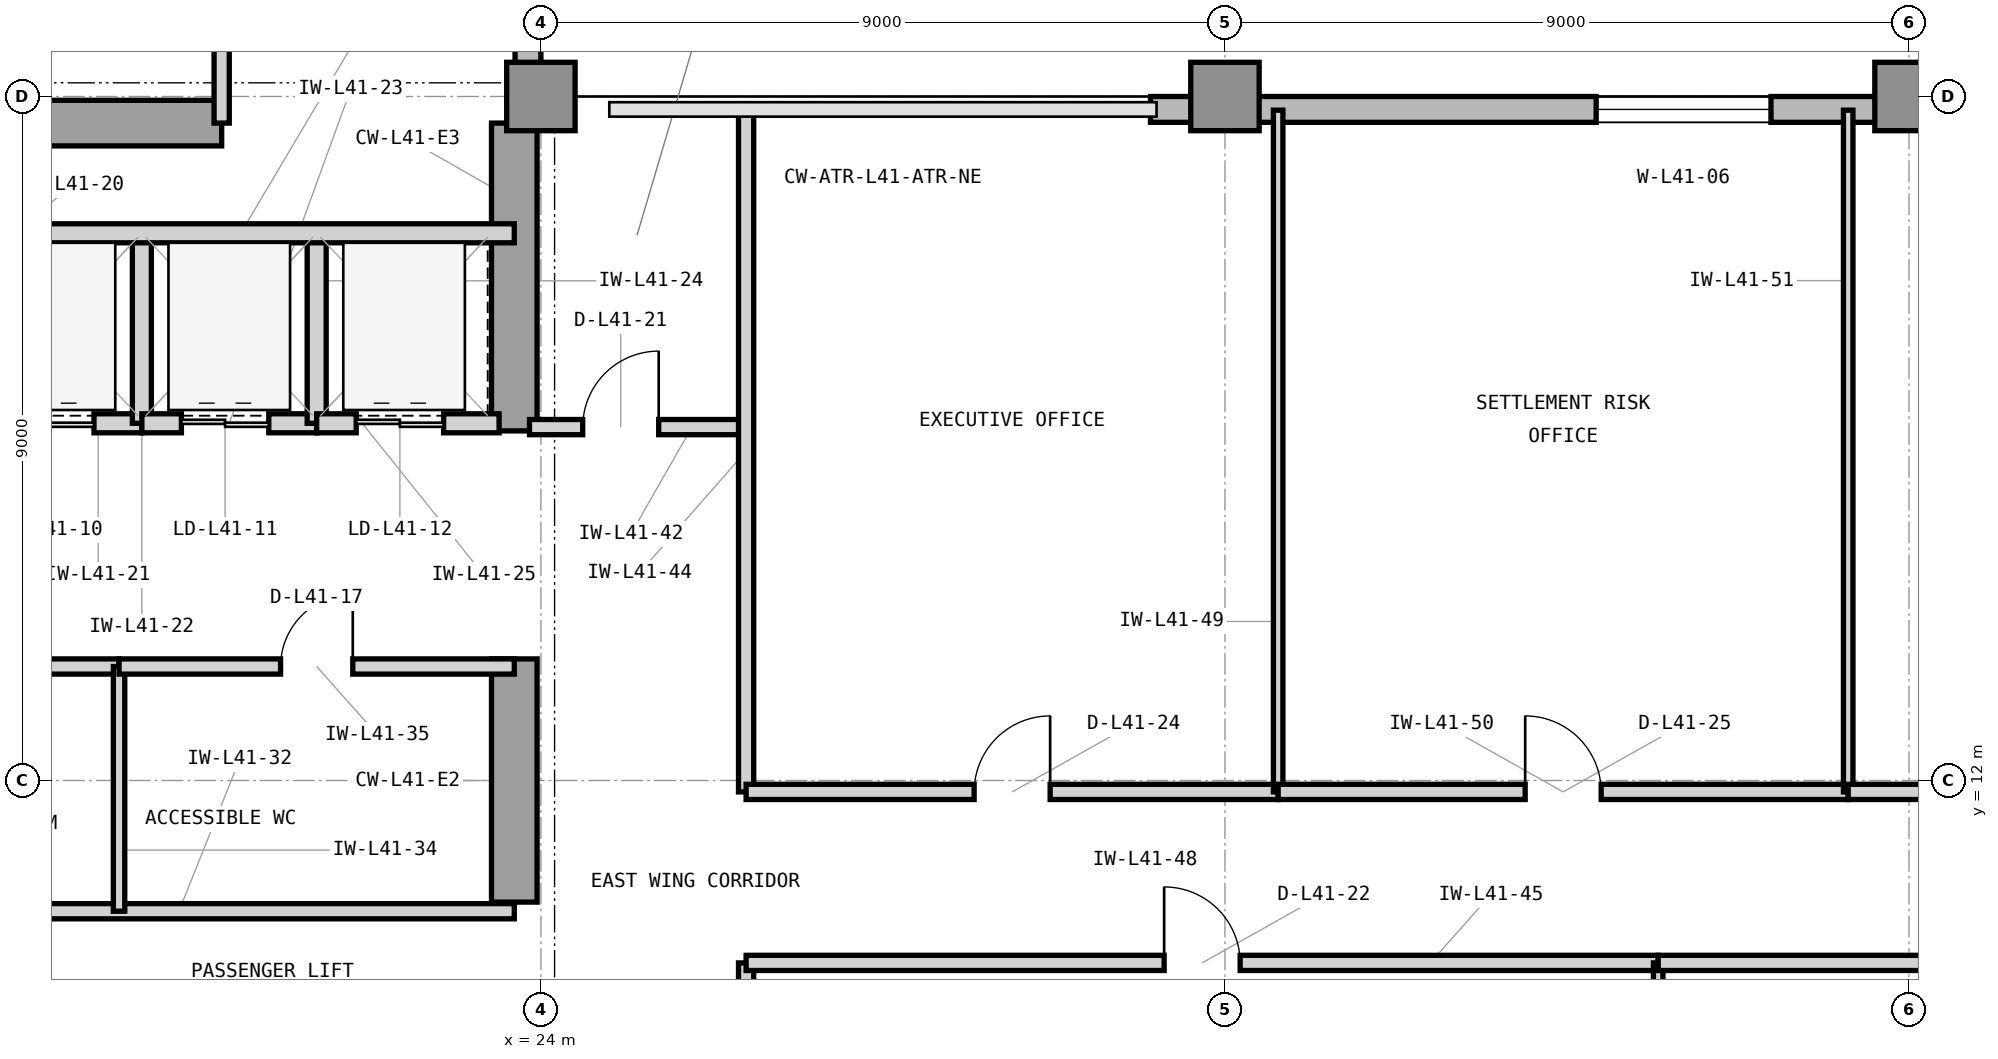
"""IFC4 building model, lengths in metres.
Left out: names, types, materials, properties, quantities, classifications, styles, units other than length and angle.
Written with IfcOpenShell. Run it as: python <this file> out.ifc"""

import sys

from ifc_helpers import new_model, si_unit, direction, frame, frame_2d, origin, origin_2d, place, context, subcontext, project, spatial, rectangle, extrude, element, fill, save


model = new_model("IFC4")
c1 = context("Model", 3, precision=1e-05, world=origin(), true_north=direction((0.0, 1.0)))
c2 = subcontext(c1, "Body", "Model", "MODEL_VIEW")
j1 = project(units=[si_unit("LENGTHUNIT", "METRE"), si_unit("PLANEANGLEUNIT", "RADIAN")], contexts=[c1])
p1 = place(None, origin())
s1 = spatial("IfcSite", under=j1, at=p1, CompositionType="ELEMENT")
p2 = place(p1, origin())
s2 = spatial("IfcBuilding", under=s1, at=p2, CompositionType="ELEMENT")
p3 = place(p2, frame((0.0, 0.0, 172.2)))
s3 = spatial("IfcBuildingStorey", under=s2, at=p3, CompositionType="ELEMENT", Elevation=172.2)
p4 = place(p3, frame((7.475, 20.65, 0.0), z_axis=(0.0, 0.0, 1.0), x_axis=(1.0, 0.0, 0.0)))
e1 = element("IfcWall", 1, at=p4, inside=s3, PredefinedType="SHEAR", context=c2, shape_type="SweptSolid", body=[
    extrude(rectangle(XDim=12.325, YDim=0.6, at=frame_2d((6.163, 0.0))), origin(), (0.0, 0.0, 1.0), 3.9),
])
p5 = place(p3, frame((23.65, 10.4, 0.0), z_axis=(0.0, 0.0, 1.0), x_axis=(0.0, 1.0, 0.0)))
e2 = element("IfcWall", 2, at=p5, inside=s3, PredefinedType="SHEAR", context=c2, shape_type="SweptSolid", body=[
    extrude(rectangle(XDim=3.2, YDim=0.6, at=frame_2d((1.6, 0.0))), origin(), (0.0, 0.0, 1.0), 3.9),
])
p6 = place(p3, frame((23.65, 16.6, 0.0), z_axis=(0.0, 0.0, 1.0), x_axis=(0.0, 1.0, 0.0)))
e3 = element("IfcWall", 3, at=p6, inside=s3, PredefinedType="SHEAR", context=c2, shape_type="SweptSolid", body=[
    extrude(rectangle(XDim=4.05, YDim=0.6, at=frame_2d((2.025, 0.0))), origin(), (0.0, 0.0, 1.0), 3.9),
])
for number, where, z_axis, x_axis in (
    (4, (24.0, 21.0, 0.0), (0.0, 0.0, 1.0), (1.0, 0.0, 0.0)),
    (5, (33.0, 21.0, 0.0), (0.0, 0.0, 1.0), (1.0, 0.0, 0.0)),
    (6, (42.0, 21.0, 0.0), (0.0, 0.0, 1.0), (1.0, 0.0, 0.0)),
):
    element("IfcColumn", number, at=place(p3, frame(where, z_axis=z_axis, x_axis=x_axis)), inside=s3, PredefinedType="COLUMN", context=c2, shape_type="SweptSolid", body=[
        extrude(rectangle(XDim=0.9, YDim=0.9, at=origin_2d()), origin(), (0.0, 0.0, 1.0), 3.9),
    ])
p7 = place(p3, frame((55.4, 20.83, 0.0), z_axis=(0.0, 0.0, 1.0), x_axis=(-1.0, 0.0, 0.0)))
e7 = element("IfcWall", 7, at=p7, inside=s3, PredefinedType="STANDARD", context=c2, shape_type="SweptSolid", body=[
    extrude(rectangle(XDim=23.38, YDim=0.34, at=frame_2d((11.69, 0.0))), origin(), (0.0, 0.0, 1.0), 3.7),
])
p8 = place(p7, frame((15.216, 0.0, 0.9)))
e8 = element("IfcOpeningElement", 8, at=p8, cuts=e7, PredefinedType="OPENING", context=c2, shape_type="SweptSolid", body=[
    extrude(rectangle(XDim=2.3, YDim=2.2, at=frame_2d((1.15, 1.1))), frame((0.0, 0.18, 0.0), z_axis=(0.0, -1.0, 0.0), x_axis=(1.0, 0.0, 0.0)), (0.0, 0.0, 1.0), 0.36),
])
p9 = place(p7, frame((8.675, 0.0, 0.9)))
e9 = element("IfcOpeningElement", 9, at=p9, cuts=e7, PredefinedType="OPENING", context=c2, shape_type="SweptSolid", body=[
    extrude(rectangle(XDim=2.3, YDim=2.2, at=frame_2d((1.15, 1.1))), frame((0.0, 0.18, 0.0), z_axis=(0.0, -1.0, 0.0), x_axis=(1.0, 0.0, 0.0)), (0.0, 0.0, 1.0), 0.36),
])
p10 = place(p3, frame((23.83, 21.0, 0.0), z_axis=(0.0, 0.0, 1.0), x_axis=(0.0, 1.0, 0.0)))
e10 = element("IfcWall", 10, at=p10, inside=s3, PredefinedType="STANDARD", context=c2, shape_type="SweptSolid", body=[
    extrude(rectangle(XDim=22.4, YDim=0.34, at=frame_2d((11.2, 0.0))), origin(), (0.0, 0.0, 1.0), 3.7),
])
p11 = place(p3, frame((16.45, 16.7, 0.0), z_axis=(0.0, 0.0, 1.0), x_axis=(1.0, 0.0, 0.0)))
e11 = element("IfcWall", 11, at=p11, inside=s3, PredefinedType="PARTITIONING", context=c2, shape_type="SweptSolid", body=[
    extrude(rectangle(XDim=2.3, YDim=0.25, at=frame_2d((1.15, 0.0))), origin(), (0.0, 0.0, 1.0), 3.283),
])
p12 = place(p11, frame((0.52, 0.0, 0.0)))
e12 = element("IfcOpeningElement", 12, at=p12, cuts=e11, PredefinedType="OPENING", context=c2, shape_type="SweptSolid", body=[
    extrude(rectangle(XDim=1.15, YDim=2.25, at=frame_2d((0.575, 1.125))), frame((0.0, 0.135, 0.0), z_axis=(0.0, -1.0, 0.0), x_axis=(1.0, 0.0, 0.0)), (0.0, 0.0, 1.0), 0.27),
])
p13 = place(p3, frame((18.75, 16.7, 0.0), z_axis=(0.0, 0.0, 1.0), x_axis=(0.0, 1.0, 0.0)))
e13 = element("IfcWall", 13, at=p13, inside=s3, PredefinedType="PARTITIONING", context=c2, shape_type="SweptSolid", body=[
    extrude(rectangle(XDim=2.5, YDim=0.25, at=frame_2d((1.25, 0.0))), origin(), (0.0, 0.0, 1.0), 3.69),
])
p14 = place(p3, frame((18.75, 16.7, 0.0), z_axis=(0.0, 0.0, 1.0), x_axis=(1.0, 0.0, 0.0)))
e14 = element("IfcWall", 14, at=p14, inside=s3, PredefinedType="PARTITIONING", context=c2, shape_type="SweptSolid", body=[
    extrude(rectangle(XDim=2.3, YDim=0.25, at=frame_2d((1.15, 0.0))), origin(), (0.0, 0.0, 1.0), 3.283),
])
p15 = place(p14, frame((0.52, 0.0, 0.0)))
e15 = element("IfcOpeningElement", 15, at=p15, cuts=e14, PredefinedType="OPENING", context=c2, shape_type="SweptSolid", body=[
    extrude(rectangle(XDim=1.15, YDim=2.25, at=frame_2d((0.575, 1.125))), frame((0.0, 0.135, 0.0), z_axis=(0.0, -1.0, 0.0), x_axis=(1.0, 0.0, 0.0)), (0.0, 0.0, 1.0), 0.27),
])
p16 = place(p3, frame((21.05, 16.7, 0.0), z_axis=(0.0, 0.0, 1.0), x_axis=(0.0, 1.0, 0.0)))
e16 = element("IfcWall", 16, at=p16, inside=s3, PredefinedType="PARTITIONING", context=c2, shape_type="SweptSolid", body=[
    extrude(rectangle(XDim=2.5, YDim=0.25, at=frame_2d((1.25, 0.0))), origin(), (0.0, 0.0, 1.0), 3.69),
])
p17 = place(p3, frame((21.05, 16.7, 0.0), z_axis=(0.0, 0.0, 1.0), x_axis=(1.0, 0.0, 0.0)))
e17 = element("IfcWall", 17, at=p17, inside=s3, PredefinedType="PARTITIONING", context=c2, shape_type="SweptSolid", body=[
    extrude(rectangle(XDim=2.4, YDim=0.25, at=frame_2d((1.2, 0.0))), origin(), (0.0, 0.0, 1.0), 3.283),
])
p18 = place(p17, frame((0.52, 0.0, 0.0)))
e18 = element("IfcOpeningElement", 18, at=p18, cuts=e17, PredefinedType="OPENING", context=c2, shape_type="SweptSolid", body=[
    extrude(rectangle(XDim=1.15, YDim=2.25, at=frame_2d((0.575, 1.125))), frame((0.0, 0.135, 0.0), z_axis=(0.0, -1.0, 0.0), x_axis=(1.0, 0.0, 0.0)), (0.0, 0.0, 1.0), 0.27),
])
p19 = place(p3, frame((16.45, 19.2, 0.0), z_axis=(0.0, 0.0, 1.0), x_axis=(1.0, 0.0, 0.0)))
e19 = element("IfcWall", 19, at=p19, inside=s3, PredefinedType="PARTITIONING", context=c2, shape_type="SweptSolid", body=[
    extrude(rectangle(XDim=7.2, YDim=0.25, at=frame_2d((3.6, 0.0))), origin(), (0.0, 0.0, 1.0), 3.69),
])
p20 = place(p3, frame((14.825, 10.28, 0.0), z_axis=(0.0, 0.0, 1.0), x_axis=(1.0, 0.0, 0.0)))
e20 = element("IfcWall", 20, at=p20, inside=s3, PredefinedType="PARTITIONING", context=c2, shape_type="SweptSolid", body=[
    extrude(rectangle(XDim=8.825, YDim=0.2, at=frame_2d((4.413, 0.0))), origin(), (0.0, 0.0, 1.0), 3.69),
])
p21 = place(p3, frame((14.7, 13.5, 0.0), z_axis=(0.0, 0.0, 1.0), x_axis=(1.0, 0.0, 0.0)))
e21 = element("IfcWall", 21, at=p21, inside=s3, PredefinedType="PARTITIONING", context=c2, shape_type="SweptSolid", body=[
    extrude(rectangle(XDim=3.75, YDim=0.2, at=frame_2d((1.875, 0.0))), origin(), (0.0, 0.0, 1.0), 3.283),
])
p22 = place(p21, frame((1.4, 0.0, 0.0)))
e22 = element("IfcOpeningElement", 22, at=p22, cuts=e21, PredefinedType="OPENING", context=c2, shape_type="SweptSolid", body=[
    extrude(rectangle(XDim=0.95, YDim=2.1, at=frame_2d((0.475, 1.05))), frame((0.0, 0.11, 0.0), z_axis=(0.0, -1.0, 0.0), x_axis=(1.0, 0.0, 0.0)), (0.0, 0.0, 1.0), 0.22),
])
p23 = place(p3, frame((18.45, 10.28, 0.0), z_axis=(0.0, 0.0, 1.0), x_axis=(0.0, 1.0, 0.0)))
e23 = element("IfcWall", 23, at=p23, inside=s3, PredefinedType="PARTITIONING", context=c2, shape_type="SweptSolid", body=[
    extrude(rectangle(XDim=3.22, YDim=0.15, at=frame_2d((1.61, 0.0))), origin(), (0.0, 0.0, 1.0), 3.69),
])
p24 = place(p3, frame((18.45, 13.5, 0.0), z_axis=(0.0, 0.0, 1.0), x_axis=(1.0, 0.0, 0.0)))
e24 = element("IfcWall", 24, at=p24, inside=s3, PredefinedType="PARTITIONING", context=c2, shape_type="SweptSolid", body=[
    extrude(rectangle(XDim=5.2, YDim=0.2, at=frame_2d((2.6, 0.0))), origin(), (0.0, 0.0, 1.0), 3.283),
])
p25 = place(p24, frame((2.125, 0.0, 0.0)))
e25 = element("IfcOpeningElement", 25, at=p25, cuts=e24, PredefinedType="OPENING", context=c2, shape_type="SweptSolid", body=[
    extrude(rectangle(XDim=0.95, YDim=2.1, at=frame_2d((0.475, 1.05))), frame((0.0, 0.11, 0.0), z_axis=(0.0, -1.0, 0.0), x_axis=(1.0, 0.0, 0.0)), (0.0, 0.0, 1.0), 0.22),
])
p26 = place(p3, frame((23.85, 16.65, 0.0), z_axis=(0.0, 0.0, 1.0), x_axis=(1.0, 0.0, 0.0)))
e26 = element("IfcWall", 26, at=p26, inside=s3, PredefinedType="PARTITIONING", context=c2, shape_type="SweptSolid", body=[
    extrude(rectangle(XDim=2.85, YDim=0.2, at=frame_2d((1.425, 0.0))), origin(), (0.0, 0.0, 1.0), 3.69),
])
p27 = place(p26, frame((0.7, 0.0, 0.0)))
e27 = element("IfcOpeningElement", 27, at=p27, cuts=e26, PredefinedType="OPENING", context=c2, shape_type="SweptSolid", body=[
    extrude(rectangle(XDim=1.0, YDim=2.15, at=frame_2d((0.5, 1.075))), frame((0.0, 0.11, 0.0), z_axis=(0.0, -1.0, 0.0), x_axis=(1.0, 0.0, 0.0)), (0.0, 0.0, 1.0), 0.22),
])
p28 = place(p3, frame((26.7, 3.18, 0.0), z_axis=(0.0, 0.0, 1.0), x_axis=(0.0, 1.0, 0.0)))
e28 = element("IfcWall", 28, at=p28, inside=s3, PredefinedType="PARTITIONING", context=c2, shape_type="SweptSolid", body=[
    extrude(rectangle(XDim=6.42, YDim=0.2, at=frame_2d((3.21, 0.0))), origin(), (0.0, 0.0, 1.0), 3.69),
])
p29 = place(p3, frame((26.7, 11.85, 0.0), z_axis=(0.0, 0.0, 1.0), x_axis=(0.0, 1.0, 0.0)))
e29 = element("IfcWall", 29, at=p29, inside=s3, PredefinedType="PARTITIONING", context=c2, shape_type="SweptSolid", body=[
    extrude(rectangle(XDim=8.97, YDim=0.2, at=frame_2d((4.485, 0.0))), origin(), (0.0, 0.0, 1.0), 3.69),
])
p30 = place(p3, frame((26.7, 9.6, 0.0), z_axis=(0.0, 0.0, 1.0), x_axis=(1.0, 0.0, 0.0)))
e30 = element("IfcWall", 30, at=p30, inside=s3, PredefinedType="PARTITIONING", context=c2, shape_type="SweptSolid", body=[
    extrude(rectangle(XDim=12.0, YDim=0.2, at=frame_2d((6.0, 0.0))), origin(), (0.0, 0.0, 1.0), 3.69),
])
p31 = place(p30, frame((5.5, 0.0, 0.0)))
e31 = element("IfcOpeningElement", 31, at=p31, cuts=e30, PredefinedType="OPENING", context=c2, shape_type="SweptSolid", body=[
    extrude(rectangle(XDim=1.0, YDim=2.15, at=frame_2d((0.5, 1.075))), frame((0.0, 0.11, 0.0), z_axis=(0.0, -1.0, 0.0), x_axis=(1.0, 0.0, 0.0)), (0.0, 0.0, 1.0), 0.22),
])
p32 = place(p3, frame((38.7, 3.18, 0.0), z_axis=(0.0, 0.0, 1.0), x_axis=(0.0, 1.0, 0.0)))
e32 = element("IfcWall", 32, at=p32, inside=s3, PredefinedType="PARTITIONING", context=c2, shape_type="SweptSolid", body=[
    extrude(rectangle(XDim=6.42, YDim=0.125, at=frame_2d((3.21, 0.0))), origin(), (0.0, 0.0, 1.0), 3.69),
])
p33 = place(p3, frame((38.7, 9.6, 0.0), z_axis=(0.0, 0.0, 1.0), x_axis=(1.0, 0.0, 0.0)))
e33 = element("IfcWall", 33, at=p33, inside=s3, PredefinedType="PARTITIONING", context=c2, shape_type="SweptSolid", body=[
    extrude(rectangle(XDim=11.3, YDim=0.2, at=frame_2d((5.65, 0.0))), origin(), (0.0, 0.0, 1.0), 3.69),
])
p34 = place(p33, frame((4.9, 0.0, 0.0)))
e34 = element("IfcOpeningElement", 34, at=p34, cuts=e33, PredefinedType="OPENING", context=c2, shape_type="SweptSolid", body=[
    extrude(rectangle(XDim=1.5, YDim=2.3, at=frame_2d((0.75, 1.15))), frame((0.0, 0.11, 0.0), z_axis=(0.0, -1.0, 0.0), x_axis=(1.0, 0.0, 0.0)), (0.0, 0.0, 1.0), 0.22),
])
p35 = place(p3, frame((26.7, 11.85, 0.0), z_axis=(0.0, 0.0, 1.0), x_axis=(1.0, 0.0, 0.0)))
e35 = element("IfcWall", 35, at=p35, inside=s3, PredefinedType="PARTITIONING", context=c2, shape_type="SweptSolid", body=[
    extrude(rectangle(XDim=7.0, YDim=0.2, at=frame_2d((3.5, 0.0))), origin(), (0.0, 0.0, 1.0), 3.69),
])
p36 = place(p35, frame((3.0, 0.0, 0.0)))
e36 = element("IfcOpeningElement", 36, at=p36, cuts=e35, PredefinedType="OPENING", context=c2, shape_type="SweptSolid", body=[
    extrude(rectangle(XDim=1.0, YDim=2.15, at=frame_2d((0.5, 1.075))), frame((0.0, 0.11, 0.0), z_axis=(0.0, -1.0, 0.0), x_axis=(1.0, 0.0, 0.0)), (0.0, 0.0, 1.0), 0.22),
])
p37 = place(p3, frame((33.7, 11.85, 0.0), z_axis=(0.0, 0.0, 1.0), x_axis=(0.0, 1.0, 0.0)))
e37 = element("IfcWall", 37, at=p37, inside=s3, PredefinedType="PARTITIONING", context=c2, shape_type="SweptSolid", body=[
    extrude(rectangle(XDim=8.97, YDim=0.125, at=frame_2d((4.485, 0.0))), origin(), (0.0, 0.0, 1.0), 3.69),
])
p38 = place(p3, frame((33.7, 11.85, 0.0), z_axis=(0.0, 0.0, 1.0), x_axis=(1.0, 0.0, 0.0)))
e38 = element("IfcWall", 38, at=p38, inside=s3, PredefinedType="PARTITIONING", context=c2, shape_type="SweptSolid", body=[
    extrude(rectangle(XDim=7.5, YDim=0.2, at=frame_2d((3.75, 0.0))), origin(), (0.0, 0.0, 1.0), 3.69),
])
p39 = place(p38, frame((3.25, 0.0, 0.0)))
e39 = element("IfcOpeningElement", 39, at=p39, cuts=e38, PredefinedType="OPENING", context=c2, shape_type="SweptSolid", body=[
    extrude(rectangle(XDim=1.0, YDim=2.15, at=frame_2d((0.5, 1.075))), frame((0.0, 0.11, 0.0), z_axis=(0.0, -1.0, 0.0), x_axis=(1.0, 0.0, 0.0)), (0.0, 0.0, 1.0), 0.22),
])
p40 = place(p3, frame((41.2, 11.85, 0.0), z_axis=(0.0, 0.0, 1.0), x_axis=(0.0, 1.0, 0.0)))
e40 = element("IfcWall", 40, at=p40, inside=s3, PredefinedType="PARTITIONING", context=c2, shape_type="SweptSolid", body=[
    extrude(rectangle(XDim=8.97, YDim=0.125, at=frame_2d((4.485, 0.0))), origin(), (0.0, 0.0, 1.0), 3.69),
])
p41 = place(p3, frame((41.2, 11.85, 0.0), z_axis=(0.0, 0.0, 1.0), x_axis=(1.0, 0.0, 0.0)))
e41 = element("IfcWall", 41, at=p41, inside=s3, PredefinedType="PARTITIONING", context=c2, shape_type="SweptSolid", body=[
    extrude(rectangle(XDim=8.8, YDim=0.2, at=frame_2d((4.4, 0.0))), origin(), (0.0, 0.0, 1.0), 3.69),
])
p42 = place(p41, frame((3.9, 0.0, 0.0)))
e42 = element("IfcOpeningElement", 42, at=p42, cuts=e41, PredefinedType="OPENING", context=c2, shape_type="SweptSolid", body=[
    extrude(rectangle(XDim=1.0, YDim=2.15, at=frame_2d((0.5, 1.075))), frame((0.0, 0.11, 0.0), z_axis=(0.0, -1.0, 0.0), x_axis=(1.0, 0.0, 0.0)), (0.0, 0.0, 1.0), 0.22),
])
p43 = place(p3, frame((19.8, 20.65, 0.0), z_axis=(0.0, 0.0, 1.0), x_axis=(0.0, 1.0, 0.0)))
e43 = element("IfcWall", 43, at=p43, inside=s3, PredefinedType="PARTITIONING", context=c2, shape_type="SweptSolid", body=[
    extrude(rectangle(XDim=6.15, YDim=0.2, at=frame_2d((3.075, 0.0))), origin(), (0.0, 0.0, 1.0), 3.69),
])
p44 = place(p8, origin())
e44 = element("IfcWindow", 44, at=p44, inside=s3, PartitioningType="SINGLE_PANEL", PredefinedType="WINDOW", context=c2, shape_type="SweptSolid", body=[
    extrude(rectangle(XDim=2.3, YDim=2.2, at=frame_2d((1.15, 1.1))), frame((0.0, 0.11, 0.0), z_axis=(0.0, -1.0, 0.0), x_axis=(1.0, 0.0, 0.0)), (0.0, 0.0, 1.0), 0.06),
])
fill(e8, e44)
p45 = place(p12, origin())
e45 = element("IfcDoor", 45, at=p45, inside=s3, OperationType="DOUBLE_DOOR_SLIDING", PredefinedType="DOOR", context=c2, shape_type="SweptSolid", body=[
    extrude(rectangle(XDim=1.15, YDim=2.25, at=frame_2d((0.575, 1.125))), frame((0.0, 0.025, 0.0), z_axis=(0.0, -1.0, 0.0), x_axis=(1.0, 0.0, 0.0)), (0.0, 0.0, 1.0), 0.05),
])
fill(e12, e45)
p46 = place(p15, origin())
e46 = element("IfcDoor", 46, at=p46, inside=s3, OperationType="DOUBLE_DOOR_SLIDING", PredefinedType="DOOR", context=c2, shape_type="SweptSolid", body=[
    extrude(rectangle(XDim=1.15, YDim=2.25, at=frame_2d((0.575, 1.125))), frame((0.0, 0.025, 0.0), z_axis=(0.0, -1.0, 0.0), x_axis=(1.0, 0.0, 0.0)), (0.0, 0.0, 1.0), 0.05),
])
fill(e15, e46)
p47 = place(p18, origin())
e47 = element("IfcDoor", 47, at=p47, inside=s3, OperationType="DOUBLE_DOOR_SLIDING", PredefinedType="DOOR", context=c2, shape_type="SweptSolid", body=[
    extrude(rectangle(XDim=1.15, YDim=2.25, at=frame_2d((0.575, 1.125))), frame((0.0, 0.025, 0.0), z_axis=(0.0, -1.0, 0.0), x_axis=(1.0, 0.0, 0.0)), (0.0, 0.0, 1.0), 0.05),
])
fill(e18, e47)
p48 = place(p25, origin())
e48 = element("IfcDoor", 48, at=p48, inside=s3, OperationType="SINGLE_SWING_RIGHT", PredefinedType="DOOR", context=c2, shape_type="SweptSolid", body=[
    extrude(rectangle(XDim=0.95, YDim=2.1, at=frame_2d((0.475, 1.05))), frame((0.0, 0.025, 0.0), z_axis=(0.0, -1.0, 0.0), x_axis=(1.0, 0.0, 0.0)), (0.0, 0.0, 1.0), 0.05),
])
fill(e25, e48)
p49 = place(p27, origin())
e49 = element("IfcDoor", 49, at=p49, inside=s3, OperationType="SINGLE_SWING_RIGHT", PredefinedType="DOOR", context=c2, shape_type="SweptSolid", body=[
    extrude(rectangle(XDim=1.0, YDim=2.15, at=frame_2d((0.5, 1.075))), frame((0.0, 0.025, 0.0), z_axis=(0.0, -1.0, 0.0), x_axis=(1.0, 0.0, 0.0)), (0.0, 0.0, 1.0), 0.05),
])
fill(e27, e49)
p50 = place(p31, origin())
e50 = element("IfcDoor", 50, at=p50, inside=s3, OperationType="SINGLE_SWING_LEFT", PredefinedType="DOOR", context=c2, shape_type="SweptSolid", body=[
    extrude(rectangle(XDim=1.0, YDim=2.15, at=frame_2d((0.5, 1.075))), frame((0.0, 0.025, 0.0), z_axis=(0.0, -1.0, 0.0), x_axis=(1.0, 0.0, 0.0)), (0.0, 0.0, 1.0), 0.05),
])
fill(e31, e50)
p51 = place(p36, origin())
e51 = element("IfcDoor", 51, at=p51, inside=s3, OperationType="SINGLE_SWING_RIGHT", PredefinedType="DOOR", context=c2, shape_type="SweptSolid", body=[
    extrude(rectangle(XDim=1.0, YDim=2.15, at=frame_2d((0.5, 1.075))), frame((0.0, 0.025, 0.0), z_axis=(0.0, -1.0, 0.0), x_axis=(1.0, 0.0, 0.0)), (0.0, 0.0, 1.0), 0.05),
])
fill(e36, e51)
p52 = place(p39, origin())
e52 = element("IfcDoor", 52, at=p52, inside=s3, OperationType="SINGLE_SWING_LEFT", PredefinedType="DOOR", context=c2, shape_type="SweptSolid", body=[
    extrude(rectangle(XDim=1.0, YDim=2.15, at=frame_2d((0.5, 1.075))), frame((0.0, 0.025, 0.0), z_axis=(0.0, -1.0, 0.0), x_axis=(1.0, 0.0, 0.0)), (0.0, 0.0, 1.0), 0.05),
])
fill(e39, e52)
save(model, sys.argv[1])
